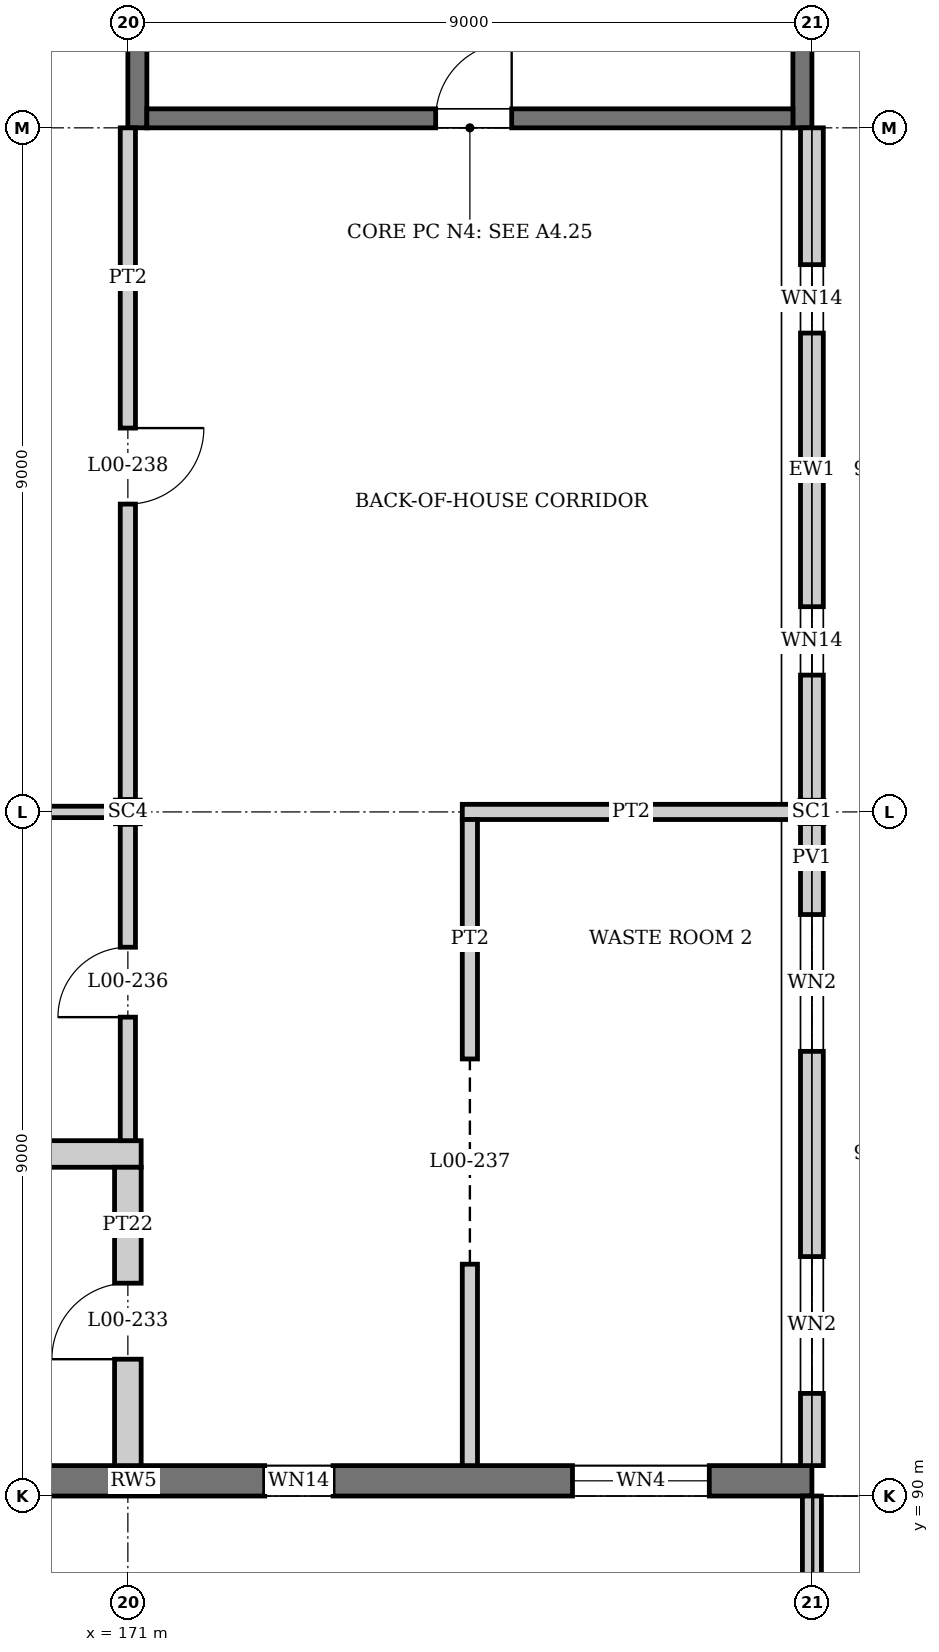
"""IFC4 building model, lengths in metres.
Left out: names, types, materials, properties, quantities, classifications, styles, units other than length and angle.
Written with IfcOpenShell. Run it as: python <this file> out.ifc"""

import sys

from ifc_helpers import new_model, si_unit, direction, frame, frame_2d, origin, origin_2d, place, context, subcontext, project, spatial, rectangle, i_section, extrude, element, fill, save


model = new_model("IFC4")
c1 = context("Model", 3, precision=1e-05, world=origin(), true_north=direction((0.0, 1.0)))
c2 = subcontext(c1, "Body", "Model", "MODEL_VIEW")
j1 = project(units=[si_unit("LENGTHUNIT", "METRE"), si_unit("PLANEANGLEUNIT", "RADIAN")], contexts=[c1])
p1 = place(None, origin())
s1 = spatial("IfcSite", under=j1, at=p1, CompositionType="ELEMENT")
p2 = place(p1, origin())
s2 = spatial("IfcBuilding", under=s1, at=p2, CompositionType="ELEMENT")
p3 = place(p2, origin())
s3 = spatial("IfcBuildingStorey", under=s2, at=p3, CompositionType="ELEMENT", Elevation=0.0)
p4 = place(p3, frame((171.0, 99.0, 0.0), z_axis=(0.0, 0.0, 1.0), x_axis=(0.0, 1.0, 0.0)))
e1 = element("IfcColumn", 1, at=p4, inside=s3, PredefinedType="COLUMN", context=c2, shape_type="SweptSolid", body=[
    extrude(i_section(OverallWidth=0.311, OverallDepth=0.327, WebThickness=0.016, FlangeThickness=0.025, at=origin_2d()), origin(), (0.0, 0.0, 1.0), 6.0),
])
p5 = place(p3, frame((180.0, 99.0, 0.0), z_axis=(0.0, 0.0, 1.0), x_axis=(0.0, 1.0, 0.0)))
e2 = element("IfcColumn", 2, at=p5, inside=s3, PredefinedType="COLUMN", context=c2, shape_type="SweptSolid", body=[
    extrude(i_section(OverallWidth=0.307, OverallDepth=0.315, WebThickness=0.012, FlangeThickness=0.019, at=origin_2d()), origin(), (0.0, 0.0, 1.0), 6.0),
])
p6 = place(p3, frame((171.125, 108.0, 0.0), z_axis=(0.0, 0.0, 1.0), x_axis=(0.0, 1.0, 0.0)))
e3 = element("IfcWall", 3, at=p6, inside=s3, PredefinedType="SHEAR", context=c2, shape_type="SweptSolid", body=[
    extrude(rectangle(XDim=9.0, YDim=0.25, at=frame_2d((4.5, 0.0))), origin(), (0.0, 0.0, 1.0), 6.0),
])
p7 = place(p3, frame((179.875, 108.0, 0.0), z_axis=(0.0, 0.0, 1.0), x_axis=(0.0, 1.0, 0.0)))
e4 = element("IfcWall", 4, at=p7, inside=s3, PredefinedType="SHEAR", context=c2, shape_type="SweptSolid", body=[
    extrude(rectangle(XDim=9.0, YDim=0.25, at=frame_2d((4.5, 0.0))), origin(), (0.0, 0.0, 1.0), 6.0),
])
p8 = place(p7, frame((6.95, 0.0, 0.0)))
e5 = element("IfcOpeningElement", 5, at=p8, cuts=e4, PredefinedType="OPENING", context=c2, shape_type="SweptSolid", body=[
    extrude(rectangle(XDim=1.8, YDim=2.4, at=frame_2d((0.9, 1.2))), frame((0.0, 0.135, 0.0), z_axis=(0.0, -1.0, 0.0), x_axis=(1.0, 0.0, 0.0)), (0.0, 0.0, 1.0), 0.27),
])
p9 = place(p3, frame((171.25, 108.125, 0.0), z_axis=(0.0, 0.0, 1.0), x_axis=(1.0, 0.0, 0.0)))
e6 = element("IfcWall", 6, at=p9, inside=s3, PredefinedType="SHEAR", context=c2, shape_type="SweptSolid", body=[
    extrude(rectangle(XDim=8.5, YDim=0.25, at=frame_2d((4.25, 0.0))), origin(), (0.0, 0.0, 1.0), 6.0),
])
p10 = place(p9, frame((3.8, 0.0, 0.0)))
e7 = element("IfcOpeningElement", 7, at=p10, cuts=e6, PredefinedType="OPENING", context=c2, shape_type="SweptSolid", body=[
    extrude(rectangle(XDim=1.0, YDim=2.1, at=frame_2d((0.5, 1.05))), frame((0.0, 0.135, 0.0), z_axis=(0.0, -1.0, 0.0), x_axis=(1.0, 0.0, 0.0)), (0.0, 0.0, 1.0), 0.27),
])
p11 = place(p3, frame((144.16, 90.2, 0.0), z_axis=(0.0, 0.0, 1.0), x_axis=(1.0, 0.0, 0.0)))
e8 = element("IfcWall", 8, at=p11, inside=s3, PredefinedType="SHEAR", context=c2, shape_type="SweptSolid", body=[
    extrude(rectangle(XDim=35.84, YDim=0.4, at=frame_2d((17.92, 0.0))), origin(), (0.0, 0.0, 1.0), 6.0),
])
p12 = place(p11, frame((1.49, 0.0, 1.2)))
e9 = element("IfcOpeningElement", 9, at=p12, cuts=e8, PredefinedType="OPENING", context=c2, shape_type="SweptSolid", body=[
    extrude(rectangle(XDim=1.2, YDim=1.2, at=frame_2d((0.6, 0.6))), frame((0.0, 0.21, 0.0), z_axis=(0.0, -1.0, 0.0), x_axis=(1.0, 0.0, 0.0)), (0.0, 0.0, 1.0), 0.42),
])
p13 = place(p11, frame((5.99, 0.0, 1.2)))
e10 = element("IfcOpeningElement", 10, at=p13, cuts=e8, PredefinedType="OPENING", context=c2, shape_type="SweptSolid", body=[
    extrude(rectangle(XDim=1.2, YDim=1.2, at=frame_2d((0.6, 0.6))), frame((0.0, 0.21, 0.0), z_axis=(0.0, -1.0, 0.0), x_axis=(1.0, 0.0, 0.0)), (0.0, 0.0, 1.0), 0.42),
])
p14 = place(p11, frame((10.49, 0.0, 1.2)))
e11 = element("IfcOpeningElement", 11, at=p14, cuts=e8, PredefinedType="OPENING", context=c2, shape_type="SweptSolid", body=[
    extrude(rectangle(XDim=1.2, YDim=1.2, at=frame_2d((0.6, 0.6))), frame((0.0, 0.21, 0.0), z_axis=(0.0, -1.0, 0.0), x_axis=(1.0, 0.0, 0.0)), (0.0, 0.0, 1.0), 0.42),
])
p15 = place(p11, frame((14.99, 0.0, 1.2)))
e12 = element("IfcOpeningElement", 12, at=p15, cuts=e8, PredefinedType="OPENING", context=c2, shape_type="SweptSolid", body=[
    extrude(rectangle(XDim=1.2, YDim=1.2, at=frame_2d((0.6, 0.6))), frame((0.0, 0.21, 0.0), z_axis=(0.0, -1.0, 0.0), x_axis=(1.0, 0.0, 0.0)), (0.0, 0.0, 1.0), 0.42),
])
p16 = place(p11, frame((19.49, 0.0, 1.2)))
e13 = element("IfcOpeningElement", 13, at=p16, cuts=e8, PredefinedType="OPENING", context=c2, shape_type="SweptSolid", body=[
    extrude(rectangle(XDim=1.2, YDim=1.2, at=frame_2d((0.6, 0.6))), frame((0.0, 0.21, 0.0), z_axis=(0.0, -1.0, 0.0), x_axis=(1.0, 0.0, 0.0)), (0.0, 0.0, 1.0), 0.42),
])
p17 = place(p11, frame((23.99, 0.0, 1.2)))
e14 = element("IfcOpeningElement", 14, at=p17, cuts=e8, PredefinedType="OPENING", context=c2, shape_type="SweptSolid", body=[
    extrude(rectangle(XDim=1.2, YDim=1.2, at=frame_2d((0.6, 0.6))), frame((0.0, 0.21, 0.0), z_axis=(0.0, -1.0, 0.0), x_axis=(1.0, 0.0, 0.0)), (0.0, 0.0, 1.0), 0.42),
])
p18 = place(p11, frame((28.64, 0.0, 0.6)))
e15 = element("IfcOpeningElement", 15, at=p18, cuts=e8, PredefinedType="OPENING", context=c2, shape_type="SweptSolid", body=[
    extrude(rectangle(XDim=0.9, YDim=2.7, at=frame_2d((0.45, 1.35))), frame((0.0, 0.21, 0.0), z_axis=(0.0, -1.0, 0.0), x_axis=(1.0, 0.0, 0.0)), (0.0, 0.0, 1.0), 0.42),
])
p19 = place(p11, frame((32.69, 0.0, 0.9)))
e16 = element("IfcOpeningElement", 16, at=p19, cuts=e8, PredefinedType="OPENING", context=c2, shape_type="SweptSolid", body=[
    extrude(rectangle(XDim=1.8, YDim=1.5, at=frame_2d((0.9, 0.75))), frame((0.0, 0.21, 0.0), z_axis=(0.0, -1.0, 0.0), x_axis=(1.0, 0.0, 0.0)), (0.0, 0.0, 1.0), 0.42),
])
p20 = place(p3, frame((180.0, 90.4, 0.0), z_axis=(0.0, 0.0, 1.0), x_axis=(0.0, 1.0, 0.0)))
e17 = element("IfcWall", 17, at=p20, inside=s3, PredefinedType="SOLIDWALL", context=c2, shape_type="SweptSolid", body=[
    extrude(rectangle(XDim=8.447, YDim=0.3, at=frame_2d((4.223, 0.0))), origin(), (0.0, 0.0, 1.0), 5.444),
])
p21 = place(p20, frame((0.95, 0.0, 0.6)))
e18 = element("IfcOpeningElement", 18, at=p21, cuts=e17, PredefinedType="OPENING", context=c2, shape_type="SweptSolid", body=[
    extrude(rectangle(XDim=1.8, YDim=3.0, at=frame_2d((0.9, 1.5))), frame((0.0, 0.16, 0.0), z_axis=(0.0, -1.0, 0.0), x_axis=(1.0, 0.0, 0.0)), (0.0, 0.0, 1.0), 0.32),
])
p22 = place(p20, frame((5.45, 0.0, 0.6)))
e19 = element("IfcOpeningElement", 19, at=p22, cuts=e17, PredefinedType="OPENING", context=c2, shape_type="SweptSolid", body=[
    extrude(rectangle(XDim=1.8, YDim=3.0, at=frame_2d((0.9, 1.5))), frame((0.0, 0.16, 0.0), z_axis=(0.0, -1.0, 0.0), x_axis=(1.0, 0.0, 0.0)), (0.0, 0.0, 1.0), 0.32),
])
p23 = place(p3, frame((180.0, 99.154, 0.0), z_axis=(0.0, 0.0, 1.0), x_axis=(0.0, 1.0, 0.0)))
e20 = element("IfcWall", 20, at=p23, inside=s3, PredefinedType="SOLIDWALL", context=c2, shape_type="SweptSolid", body=[
    extrude(rectangle(XDim=8.846, YDim=0.3, at=frame_2d((4.423, 0.0))), origin(), (0.0, 0.0, 1.0), 5.444),
])
p24 = place(p23, frame((1.646, 0.0, 0.6)))
e21 = element("IfcOpeningElement", 21, at=p24, cuts=e20, PredefinedType="OPENING", context=c2, shape_type="SweptSolid", body=[
    extrude(rectangle(XDim=0.9, YDim=2.7, at=frame_2d((0.45, 1.35))), frame((0.0, 0.16, 0.0), z_axis=(0.0, -1.0, 0.0), x_axis=(1.0, 0.0, 0.0)), (0.0, 0.0, 1.0), 0.32),
])
p25 = place(p23, frame((6.146, 0.0, 0.6)))
e22 = element("IfcOpeningElement", 22, at=p25, cuts=e20, PredefinedType="OPENING", context=c2, shape_type="SweptSolid", body=[
    extrude(rectangle(XDim=0.9, YDim=2.7, at=frame_2d((0.45, 1.35))), frame((0.0, 0.16, 0.0), z_axis=(0.0, -1.0, 0.0), x_axis=(1.0, 0.0, 0.0)), (0.0, 0.0, 1.0), 0.32),
])
p26 = place(p3, frame((180.0, 81.0, 0.0), z_axis=(0.0, 0.0, 1.0), x_axis=(0.0, 1.0, 0.0)))
e23 = element("IfcWall", 23, at=p26, inside=s3, PredefinedType="SOLIDWALL", context=c2, shape_type="SweptSolid", body=[
    extrude(rectangle(XDim=9.0, YDim=0.25, at=frame_2d((4.5, 0.0))), origin(), (0.0, 0.0, 1.0), 2.9),
])
p27 = place(p26, frame((1.25, 0.0, 0.0)))
e24 = element("IfcOpeningElement", 24, at=p27, cuts=e23, PredefinedType="OPENING", context=c2, shape_type="SweptSolid", body=[
    extrude(rectangle(XDim=6.5, YDim=2.5, at=frame_2d((3.25, 1.25))), frame((0.0, 0.135, 0.0), z_axis=(0.0, -1.0, 0.0), x_axis=(1.0, 0.0, 0.0)), (0.0, 0.0, 1.0), 0.27),
])
p28 = place(p3, frame((161.825, 94.5, 0.0), z_axis=(0.0, 0.0, 1.0), x_axis=(1.0, 0.0, 0.0)))
e25 = element("IfcWall", 25, at=p28, inside=s3, PredefinedType="PARTITIONING", context=c2, shape_type="SweptSolid", body=[
    extrude(rectangle(XDim=9.35, YDim=0.35, at=frame_2d((4.675, 0.0))), origin(), (0.0, 0.0, 1.0), 5.447),
])
p29 = place(p3, frame((162.164, 99.0, 0.0), z_axis=(0.0, 0.0, 1.0), x_axis=(1.0, 0.0, 0.0)))
e26 = element("IfcWall", 26, at=p29, inside=s3, PredefinedType="PARTITIONING", context=c2, shape_type="SweptSolid", body=[
    extrude(rectangle(XDim=8.673, YDim=0.15, at=frame_2d((4.336, 0.0))), origin(), (0.0, 0.0, 1.0), 5.322),
])
p30 = place(p3, frame((175.4, 99.0, 0.0), z_axis=(0.0, 0.0, 1.0), x_axis=(1.0, 0.0, 0.0)))
e27 = element("IfcWall", 27, at=p30, inside=s3, PredefinedType="PARTITIONING", context=c2, shape_type="SweptSolid", body=[
    extrude(rectangle(XDim=4.443, YDim=0.2, at=frame_2d((2.221, 0.0))), origin(), (0.0, 0.0, 1.0), 5.322),
])
p31 = place(p3, frame((171.0, 90.4, 0.0), z_axis=(0.0, 0.0, 1.0), x_axis=(0.0, 1.0, 0.0)))
e28 = element("IfcWall", 28, at=p31, inside=s3, PredefinedType="PARTITIONING", context=c2, shape_type="SweptSolid", body=[
    extrude(rectangle(XDim=3.925, YDim=0.35, at=frame_2d((1.962, 0.0))), origin(), (0.0, 0.0, 1.0), 5.447),
])
p32 = place(p31, frame((1.4, 0.0, 0.0)))
e29 = element("IfcOpeningElement", 29, at=p32, cuts=e28, PredefinedType="OPENING", context=c2, shape_type="SweptSolid", body=[
    extrude(rectangle(XDim=1.0, YDim=2.1, at=frame_2d((0.5, 1.05))), frame((0.0, 0.185, 0.0), z_axis=(0.0, -1.0, 0.0), x_axis=(1.0, 0.0, 0.0)), (0.0, 0.0, 1.0), 0.37),
])
p33 = place(p3, frame((171.0, 94.675, 0.0), z_axis=(0.0, 0.0, 1.0), x_axis=(0.0, 1.0, 0.0)))
e30 = element("IfcWall", 30, at=p33, inside=s3, PredefinedType="PARTITIONING", context=c2, shape_type="SweptSolid", body=[
    extrude(rectangle(XDim=4.161, YDim=0.2, at=frame_2d((2.081, 0.0))), origin(), (0.0, 0.0, 1.0), 5.447),
])
p34 = place(p33, frame((1.625, 0.0, 0.0)))
e31 = element("IfcOpeningElement", 31, at=p34, cuts=e30, PredefinedType="OPENING", context=c2, shape_type="SweptSolid", body=[
    extrude(rectangle(XDim=0.92, YDim=2.1, at=frame_2d((0.46, 1.05))), frame((0.0, 0.11, 0.0), z_axis=(0.0, -1.0, 0.0), x_axis=(1.0, 0.0, 0.0)), (0.0, 0.0, 1.0), 0.22),
])
p35 = place(p3, frame((171.0, 99.164, 0.0), z_axis=(0.0, 0.0, 1.0), x_axis=(0.0, 1.0, 0.0)))
e32 = element("IfcWall", 32, at=p35, inside=s3, PredefinedType="PARTITIONING", context=c2, shape_type="SweptSolid", body=[
    extrude(rectangle(XDim=8.836, YDim=0.2, at=frame_2d((4.418, 0.0))), origin(), (0.0, 0.0, 1.0), 5.322),
])
p36 = place(p35, frame((3.886, 0.0, 0.0)))
e33 = element("IfcOpeningElement", 33, at=p36, cuts=e32, PredefinedType="OPENING", context=c2, shape_type="SweptSolid", body=[
    extrude(rectangle(XDim=1.0, YDim=2.1, at=frame_2d((0.5, 1.05))), frame((0.0, 0.11, 0.0), z_axis=(0.0, -1.0, 0.0), x_axis=(1.0, 0.0, 0.0)), (0.0, 0.0, 1.0), 0.22),
])
p37 = place(p3, frame((175.5, 90.4, 0.0), z_axis=(0.0, 0.0, 1.0), x_axis=(0.0, 1.0, 0.0)))
e34 = element("IfcWall", 34, at=p37, inside=s3, PredefinedType="PARTITIONING", context=c2, shape_type="SweptSolid", body=[
    extrude(rectangle(XDim=8.5, YDim=0.2, at=frame_2d((4.25, 0.0))), origin(), (0.0, 0.0, 1.0), 5.322),
])
p38 = place(p37, frame((2.65, 0.0, 0.0)))
e35 = element("IfcOpeningElement", 35, at=p38, cuts=e34, PredefinedType="OPENING", context=c2, shape_type="SweptSolid", body=[
    extrude(rectangle(XDim=2.7, YDim=3.0, at=frame_2d((1.35, 1.5))), frame((0.0, 0.11, 0.0), z_axis=(0.0, -1.0, 0.0), x_axis=(1.0, 0.0, 0.0)), (0.0, 0.0, 1.0), 0.22),
])
p39 = place(p21, origin())
e36 = element("IfcWindow", 36, at=p39, inside=s3, PartitioningType="SINGLE_PANEL", PredefinedType="WINDOW", context=c2, shape_type="SweptSolid", body=[
    extrude(rectangle(XDim=1.8, YDim=3.0, at=frame_2d((0.9, 1.5))), frame((0.0, 0.03, 0.0), z_axis=(0.0, -1.0, 0.0), x_axis=(1.0, 0.0, 0.0)), (0.0, 0.0, 1.0), 0.06),
])
fill(e18, e36)
p40 = place(p22, origin())
e37 = element("IfcWindow", 37, at=p40, inside=s3, PartitioningType="SINGLE_PANEL", PredefinedType="WINDOW", context=c2, shape_type="SweptSolid", body=[
    extrude(rectangle(XDim=1.8, YDim=3.0, at=frame_2d((0.9, 1.5))), frame((0.0, 0.03, 0.0), z_axis=(0.0, -1.0, 0.0), x_axis=(1.0, 0.0, 0.0)), (0.0, 0.0, 1.0), 0.06),
])
fill(e19, e37)
p41 = place(p24, origin())
e38 = element("IfcWindow", 38, at=p41, inside=s3, PartitioningType="SINGLE_PANEL", PredefinedType="WINDOW", context=c2, shape_type="SweptSolid", body=[
    extrude(rectangle(XDim=0.9, YDim=2.7, at=frame_2d((0.45, 1.35))), frame((0.0, 0.03, 0.0), z_axis=(0.0, -1.0, 0.0), x_axis=(1.0, 0.0, 0.0)), (0.0, 0.0, 1.0), 0.06),
])
fill(e21, e38)
p42 = place(p25, origin())
e39 = element("IfcWindow", 39, at=p42, inside=s3, PartitioningType="SINGLE_PANEL", PredefinedType="WINDOW", context=c2, shape_type="SweptSolid", body=[
    extrude(rectangle(XDim=0.9, YDim=2.7, at=frame_2d((0.45, 1.35))), frame((0.0, 0.03, 0.0), z_axis=(0.0, -1.0, 0.0), x_axis=(1.0, 0.0, 0.0)), (0.0, 0.0, 1.0), 0.06),
])
fill(e22, e39)
p43 = place(p18, origin())
e40 = element("IfcWindow", 40, at=p43, inside=s3, PartitioningType="SINGLE_PANEL", PredefinedType="WINDOW", context=c2, shape_type="SweptSolid", body=[
    extrude(rectangle(XDim=0.9, YDim=2.7, at=frame_2d((0.45, 1.35))), frame((0.0, 0.03, 0.0), z_axis=(0.0, -1.0, 0.0), x_axis=(1.0, 0.0, 0.0)), (0.0, 0.0, 1.0), 0.06),
])
fill(e15, e40)
p44 = place(p19, origin())
e41 = element("IfcWindow", 41, at=p44, inside=s3, PartitioningType="SINGLE_PANEL", PredefinedType="WINDOW", context=c2, shape_type="SweptSolid", body=[
    extrude(rectangle(XDim=1.8, YDim=1.5, at=frame_2d((0.9, 0.75))), frame((0.0, 0.03, 0.0), z_axis=(0.0, -1.0, 0.0), x_axis=(1.0, 0.0, 0.0)), (0.0, 0.0, 1.0), 0.06),
])
fill(e16, e41)
p45 = place(p10, origin())
e42 = element("IfcDoor", 42, at=p45, inside=s3, OperationType="SINGLE_SWING_RIGHT", PredefinedType="DOOR", context=c2, shape_type="SweptSolid", body=[
    extrude(rectangle(XDim=1.0, YDim=2.1, at=frame_2d((0.5, 1.05))), frame((0.0, 0.025, 0.0), z_axis=(0.0, -1.0, 0.0), x_axis=(1.0, 0.0, 0.0)), (0.0, 0.0, 1.0), 0.05),
])
fill(e7, e42)
p46 = place(p32, origin())
e43 = element("IfcDoor", 43, at=p46, inside=s3, OperationType="SINGLE_SWING_LEFT", PredefinedType="DOOR", context=c2, shape_type="SweptSolid", body=[
    extrude(rectangle(XDim=1.0, YDim=2.1, at=frame_2d((0.5, 1.05))), frame((0.0, 0.025, 0.0), z_axis=(0.0, -1.0, 0.0), x_axis=(1.0, 0.0, 0.0)), (0.0, 0.0, 1.0), 0.05),
])
fill(e29, e43)
p47 = place(p34, origin())
e44 = element("IfcDoor", 44, at=p47, inside=s3, OperationType="SINGLE_SWING_LEFT", PredefinedType="DOOR", context=c2, shape_type="SweptSolid", body=[
    extrude(rectangle(XDim=0.92, YDim=2.1, at=frame_2d((0.46, 1.05))), frame((0.0, 0.025, 0.0), z_axis=(0.0, -1.0, 0.0), x_axis=(1.0, 0.0, 0.0)), (0.0, 0.0, 1.0), 0.05),
])
fill(e31, e44)
p48 = place(p38, origin())
e45 = element("IfcDoor", 45, at=p48, inside=s3, OperationType="ROLLINGUP", PredefinedType="DOOR", context=c2, shape_type="SweptSolid", body=[
    extrude(rectangle(XDim=2.7, YDim=3.0, at=frame_2d((1.35, 1.5))), frame((0.0, 0.025, 0.0), z_axis=(0.0, -1.0, 0.0), x_axis=(1.0, 0.0, 0.0)), (0.0, 0.0, 1.0), 0.05),
])
fill(e35, e45)
p49 = place(p36, frame((1.0, 0.0, 0.0), z_axis=(0.0, 0.0, 1.0), x_axis=(-1.0, 0.0, 0.0)))
e46 = element("IfcDoor", 46, at=p49, inside=s3, OperationType="SINGLE_SWING_LEFT", PredefinedType="DOOR", context=c2, shape_type="SweptSolid", body=[
    extrude(rectangle(XDim=1.0, YDim=2.1, at=frame_2d((0.5, 1.05))), frame((0.0, 0.025, 0.0), z_axis=(0.0, -1.0, 0.0), x_axis=(1.0, 0.0, 0.0)), (0.0, 0.0, 1.0), 0.05),
])
fill(e33, e46)
save(model, sys.argv[1])
